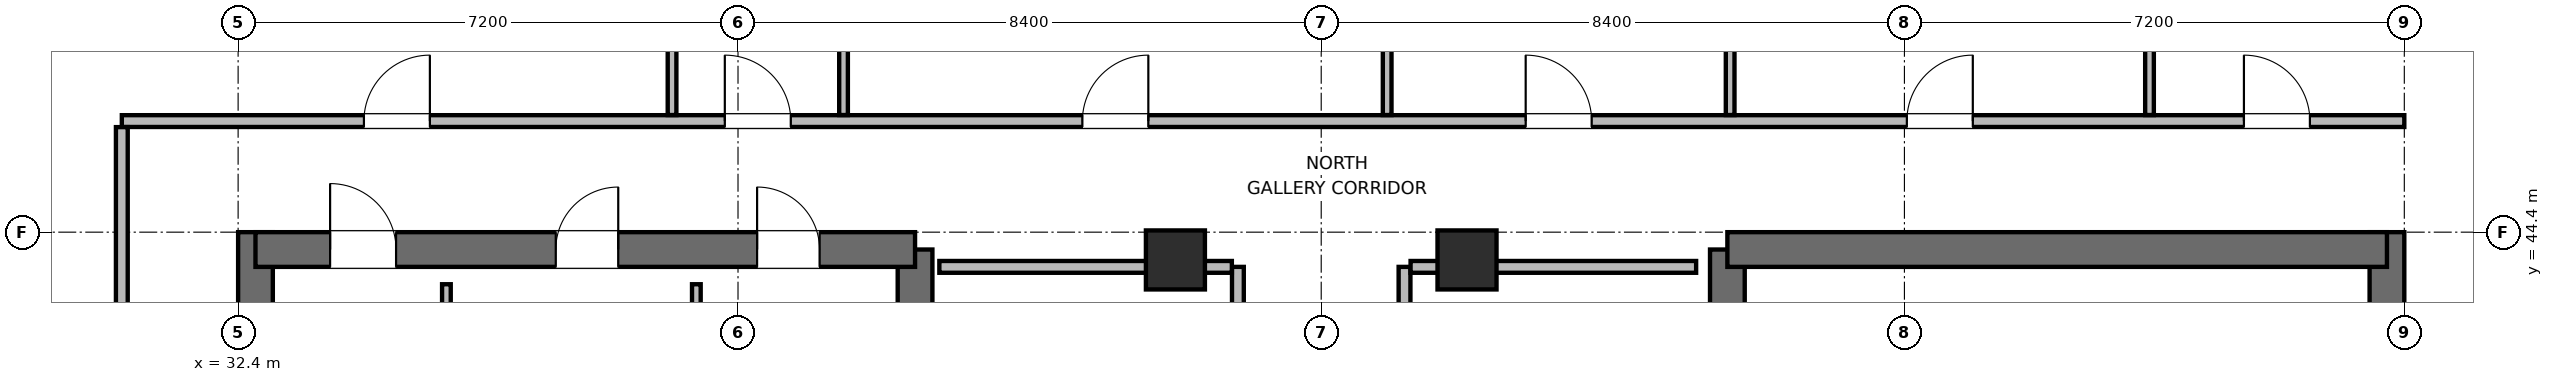
"""IFC4 building model, lengths in metres.
Left out: names, types, materials, properties, quantities, classifications, styles, units other than length and angle.
Written with IfcOpenShell. Run it as: python <this file> out.ifc"""

import sys

from ifc_helpers import new_model, si_unit, direction, frame, frame_2d, origin, origin_2d, place, context, subcontext, project, spatial, rectangle, extrude, element, fill, save


model = new_model("IFC4")
c1 = context("Model", 3, precision=1e-05, world=origin(), true_north=direction((0.0, 1.0)))
c2 = subcontext(c1, "Body", "Model", "MODEL_VIEW")
j1 = project(units=[si_unit("LENGTHUNIT", "METRE"), si_unit("PLANEANGLEUNIT", "RADIAN")], contexts=[c1])
p1 = place(None, origin())
s1 = spatial("IfcSite", under=j1, at=p1, CompositionType="ELEMENT")
p2 = place(p1, origin())
s2 = spatial("IfcBuilding", under=s1, at=p2, CompositionType="ELEMENT")
p3 = place(p2, frame((0.0, 0.0, 350.4)))
s3 = spatial("IfcBuildingStorey", under=s2, at=p3, CompositionType="ELEMENT", Elevation=350.4)
p4 = place(p3, frame((32.65, 27.6, 0.0), z_axis=(0.0, 0.0, 1.0), x_axis=(0.0, 1.0, 0.0)))
e1 = element("IfcWall", 1, at=p4, inside=s3, PredefinedType="SHEAR", context=c2, shape_type="SweptSolid", body=[
    extrude(rectangle(XDim=16.8, YDim=0.5, at=frame_2d((8.4, 0.0))), origin(), (0.0, 0.0, 1.0), 4.5),
])
p5 = place(p3, frame((42.15, 37.8, 0.0), z_axis=(0.0, 0.0, 1.0), x_axis=(0.0, 1.0, 0.0)))
e2 = element("IfcWall", 2, at=p5, inside=s3, PredefinedType="SHEAR", context=c2, shape_type="SweptSolid", body=[
    extrude(rectangle(XDim=6.35, YDim=0.5, at=frame_2d((3.175, 0.0))), origin(), (0.0, 0.0, 1.0), 4.5),
])
p6 = place(p3, frame((32.65, 44.15, 0.0), z_axis=(0.0, 0.0, 1.0), x_axis=(1.0, 0.0, 0.0)))
e3 = element("IfcWall", 3, at=p6, inside=s3, PredefinedType="SHEAR", context=c2, shape_type="SweptSolid", body=[
    extrude(rectangle(XDim=9.5, YDim=0.5, at=frame_2d((4.75, 0.0))), origin(), (0.0, 0.0, 1.0), 4.5),
])
p7 = place(p6, frame((1.075, 0.0, 0.0)))
e4 = element("IfcOpeningElement", 4, at=p7, cuts=e3, PredefinedType="OPENING", context=c2, shape_type="SweptSolid", body=[
    extrude(rectangle(XDim=0.95, YDim=2.04, at=frame_2d((0.475, 1.02))), frame((0.0, 0.26, 0.0), z_axis=(0.0, -1.0, 0.0), x_axis=(1.0, 0.0, 0.0)), (0.0, 0.0, 1.0), 0.52),
])
p8 = place(p6, frame((4.325, 0.0, 0.0)))
e5 = element("IfcOpeningElement", 5, at=p8, cuts=e3, PredefinedType="OPENING", context=c2, shape_type="SweptSolid", body=[
    extrude(rectangle(XDim=0.9, YDim=2.02, at=frame_2d((0.45, 1.01))), frame((0.0, 0.26, 0.0), z_axis=(0.0, -1.0, 0.0), x_axis=(1.0, 0.0, 0.0)), (0.0, 0.0, 1.0), 0.52),
])
p9 = place(p6, frame((7.225, 0.0, 0.0)))
e6 = element("IfcOpeningElement", 6, at=p9, cuts=e3, PredefinedType="OPENING", context=c2, shape_type="SweptSolid", body=[
    extrude(rectangle(XDim=0.9, YDim=2.02, at=frame_2d((0.45, 1.01))), frame((0.0, 0.26, 0.0), z_axis=(0.0, -1.0, 0.0), x_axis=(1.0, 0.0, 0.0)), (0.0, 0.0, 1.0), 0.52),
])
p10 = place(p3, frame((53.85, 38.0, 0.0), z_axis=(0.0, 0.0, 1.0), x_axis=(0.0, 1.0, 0.0)))
e7 = element("IfcWall", 7, at=p10, inside=s3, PredefinedType="SHEAR", context=c2, shape_type="SweptSolid", body=[
    extrude(rectangle(XDim=6.15, YDim=0.5, at=frame_2d((3.075, 0.0))), origin(), (0.0, 0.0, 1.0), 4.5),
])
p11 = place(p3, frame((63.35, 27.6, 0.0), z_axis=(0.0, 0.0, 1.0), x_axis=(0.0, 1.0, 0.0)))
e8 = element("IfcWall", 8, at=p11, inside=s3, PredefinedType="SHEAR", context=c2, shape_type="SweptSolid", body=[
    extrude(rectangle(XDim=16.8, YDim=0.5, at=frame_2d((8.4, 0.0))), origin(), (0.0, 0.0, 1.0), 4.5),
])
p12 = place(p3, frame((53.85, 44.15, 0.0), z_axis=(0.0, 0.0, 1.0), x_axis=(1.0, 0.0, 0.0)))
e9 = element("IfcWall", 9, at=p12, inside=s3, PredefinedType="SHEAR", context=c2, shape_type="SweptSolid", body=[
    extrude(rectangle(XDim=9.5, YDim=0.5, at=frame_2d((4.75, 0.0))), origin(), (0.0, 0.0, 1.0), 4.5),
])
for number, where, z_axis, x_axis in (
    (10, (45.9, 44.0, 0.0), (0.0, 0.0, 1.0), (1.0, 0.0, 0.0)),
    (11, (50.1, 44.0, 0.0), (0.0, 0.0, 1.0), (1.0, 0.0, 0.0)),
):
    element("IfcColumn", number, at=place(p3, frame(where, z_axis=z_axis, x_axis=x_axis)), inside=s3, PredefinedType="COLUMN", context=c2, shape_type="SweptSolid", body=[
        extrude(rectangle(XDim=0.85, YDim=0.85, at=origin_2d()), origin(), (0.0, 0.0, 1.0), 4.5),
    ])
for number, where, z_axis, x_axis in (
    (12, (35.4, 41.095, 0.0), (0.0, 0.0, 1.0), (0.0, 1.0, 0.0)),
    (13, (39.0, 41.095, 0.0), (0.0, 0.0, 1.0), (0.0, 1.0, 0.0)),
):
    element("IfcWall", number, at=place(p3, frame(where, z_axis=z_axis, x_axis=x_axis)), inside=s3, PredefinedType="PARTITIONING", context=c2, shape_type="SweptSolid", body=[
        extrude(rectangle(XDim=2.555, YDim=0.125, at=frame_2d((1.277, 0.0))), origin(), (0.0, 0.0, 1.0), 4.2),
    ])
p13 = place(p3, frame((46.8, 37.9, 0.0), z_axis=(0.0, 0.0, 1.0), x_axis=(0.0, 1.0, 0.0)))
e14 = element("IfcWall", 14, at=p13, inside=s3, PredefinedType="PARTITIONING", context=c2, shape_type="SweptSolid", body=[
    extrude(rectangle(XDim=6.0, YDim=0.17, at=frame_2d((3.0, 0.0))), origin(), (0.0, 0.0, 1.0), 4.2),
])
p14 = place(p13, frame((0.54, 0.0, 0.0)))
e15 = element("IfcOpeningElement", 15, at=p14, cuts=e14, PredefinedType="OPENING", context=c2, shape_type="SweptSolid", body=[
    extrude(rectangle(XDim=0.9, YDim=2.02, at=frame_2d((0.45, 1.01))), frame((0.0, 0.095, 0.0), z_axis=(0.0, -1.0, 0.0), x_axis=(1.0, 0.0, 0.0)), (0.0, 0.0, 1.0), 0.19),
])
p15 = place(p13, frame((2.55, 0.0, 0.0)))
e16 = element("IfcOpeningElement", 16, at=p15, cuts=e14, PredefinedType="OPENING", context=c2, shape_type="SweptSolid", body=[
    extrude(rectangle(XDim=0.9, YDim=2.02, at=frame_2d((0.45, 1.01))), frame((0.0, 0.095, 0.0), z_axis=(0.0, -1.0, 0.0), x_axis=(1.0, 0.0, 0.0)), (0.0, 0.0, 1.0), 0.19),
])
p16 = place(p13, frame((4.56, 0.0, 0.0)))
e17 = element("IfcOpeningElement", 17, at=p16, cuts=e14, PredefinedType="OPENING", context=c2, shape_type="SweptSolid", body=[
    extrude(rectangle(XDim=0.9, YDim=2.02, at=frame_2d((0.45, 1.01))), frame((0.0, 0.095, 0.0), z_axis=(0.0, -1.0, 0.0), x_axis=(1.0, 0.0, 0.0)), (0.0, 0.0, 1.0), 0.19),
])
p17 = place(p3, frame((42.5, 43.9, 0.0), z_axis=(0.0, 0.0, 1.0), x_axis=(1.0, 0.0, 0.0)))
e18 = element("IfcWall", 18, at=p17, inside=s3, PredefinedType="PARTITIONING", context=c2, shape_type="SweptSolid", body=[
    extrude(rectangle(XDim=4.213, YDim=0.17, at=frame_2d((2.106, 0.0))), origin(), (0.0, 0.0, 1.0), 3.285),
])
p18 = place(p3, frame((49.2, 37.9, 0.0), z_axis=(0.0, 0.0, 1.0), x_axis=(0.0, 1.0, 0.0)))
e19 = element("IfcWall", 19, at=p18, inside=s3, PredefinedType="PARTITIONING", context=c2, shape_type="SweptSolid", body=[
    extrude(rectangle(XDim=6.0, YDim=0.17, at=frame_2d((3.0, 0.0))), origin(), (0.0, 0.0, 1.0), 4.2),
])
p19 = place(p18, frame((0.69, 0.0, 0.0)))
e20 = element("IfcOpeningElement", 20, at=p19, cuts=e19, PredefinedType="OPENING", context=c2, shape_type="SweptSolid", body=[
    extrude(rectangle(XDim=0.9, YDim=2.02, at=frame_2d((0.45, 1.01))), frame((0.0, 0.095, 0.0), z_axis=(0.0, -1.0, 0.0), x_axis=(1.0, 0.0, 0.0)), (0.0, 0.0, 1.0), 0.19),
])
p20 = place(p18, frame((3.69, 0.0, 0.0)))
e21 = element("IfcOpeningElement", 21, at=p20, cuts=e19, PredefinedType="OPENING", context=c2, shape_type="SweptSolid", body=[
    extrude(rectangle(XDim=0.9, YDim=2.02, at=frame_2d((0.45, 1.01))), frame((0.0, 0.095, 0.0), z_axis=(0.0, -1.0, 0.0), x_axis=(1.0, 0.0, 0.0)), (0.0, 0.0, 1.0), 0.19),
])
p21 = place(p3, frame((49.287, 43.9, 0.0), z_axis=(0.0, 0.0, 1.0), x_axis=(1.0, 0.0, 0.0)))
e22 = element("IfcWall", 22, at=p21, inside=s3, PredefinedType="PARTITIONING", context=c2, shape_type="SweptSolid", body=[
    extrude(rectangle(XDim=4.113, YDim=0.17, at=frame_2d((2.056, 0.0))), origin(), (0.0, 0.0, 1.0), 3.285),
])
p22 = place(p3, frame((30.725, 46.0, 0.0), z_axis=(0.0, 0.0, 1.0), x_axis=(1.0, 0.0, 0.0)))
e23 = element("IfcWall", 23, at=p22, inside=s3, PredefinedType="PARTITIONING", context=c2, shape_type="SweptSolid", body=[
    extrude(rectangle(XDim=32.875, YDim=0.17, at=frame_2d((16.438, 0.0))), origin(), (0.0, 0.0, 1.0), 4.2),
])
p23 = place(p22, frame((3.487, 0.0, 0.0)))
e24 = element("IfcOpeningElement", 24, at=p23, cuts=e23, PredefinedType="OPENING", context=c2, shape_type="SweptSolid", body=[
    extrude(rectangle(XDim=0.95, YDim=2.04, at=frame_2d((0.475, 1.02))), frame((0.0, 0.095, 0.0), z_axis=(0.0, -1.0, 0.0), x_axis=(1.0, 0.0, 0.0)), (0.0, 0.0, 1.0), 0.19),
])
p24 = place(p22, frame((8.685, 0.0, 0.0)))
e25 = element("IfcOpeningElement", 25, at=p24, cuts=e23, PredefinedType="OPENING", context=c2, shape_type="SweptSolid", body=[
    extrude(rectangle(XDim=0.95, YDim=2.04, at=frame_2d((0.475, 1.02))), frame((0.0, 0.095, 0.0), z_axis=(0.0, -1.0, 0.0), x_axis=(1.0, 0.0, 0.0)), (0.0, 0.0, 1.0), 0.19),
])
p25 = place(p22, frame((13.835, 0.0, 0.0)))
e26 = element("IfcOpeningElement", 26, at=p25, cuts=e23, PredefinedType="OPENING", context=c2, shape_type="SweptSolid", body=[
    extrude(rectangle(XDim=0.95, YDim=2.04, at=frame_2d((0.475, 1.02))), frame((0.0, 0.095, 0.0), z_axis=(0.0, -1.0, 0.0), x_axis=(1.0, 0.0, 0.0)), (0.0, 0.0, 1.0), 0.19),
])
p26 = place(p22, frame((20.22, 0.0, 0.0)))
e27 = element("IfcOpeningElement", 27, at=p26, cuts=e23, PredefinedType="OPENING", context=c2, shape_type="SweptSolid", body=[
    extrude(rectangle(XDim=0.95, YDim=2.04, at=frame_2d((0.475, 1.02))), frame((0.0, 0.095, 0.0), z_axis=(0.0, -1.0, 0.0), x_axis=(1.0, 0.0, 0.0)), (0.0, 0.0, 1.0), 0.19),
])
p27 = place(p22, frame((25.71, 0.0, 0.0)))
e28 = element("IfcOpeningElement", 28, at=p27, cuts=e23, PredefinedType="OPENING", context=c2, shape_type="SweptSolid", body=[
    extrude(rectangle(XDim=0.95, YDim=2.04, at=frame_2d((0.475, 1.02))), frame((0.0, 0.095, 0.0), z_axis=(0.0, -1.0, 0.0), x_axis=(1.0, 0.0, 0.0)), (0.0, 0.0, 1.0), 0.19),
])
p28 = place(p22, frame((30.565, 0.0, 0.0)))
e29 = element("IfcOpeningElement", 29, at=p28, cuts=e23, PredefinedType="OPENING", context=c2, shape_type="SweptSolid", body=[
    extrude(rectangle(XDim=0.95, YDim=2.04, at=frame_2d((0.475, 1.02))), frame((0.0, 0.095, 0.0), z_axis=(0.0, -1.0, 0.0), x_axis=(1.0, 0.0, 0.0)), (0.0, 0.0, 1.0), 0.19),
])
p29 = place(p3, frame((30.725, 26.087, 0.0), z_axis=(0.0, 0.0, 1.0), x_axis=(0.0, 1.0, 0.0)))
e30 = element("IfcWall", 30, at=p29, inside=s3, PredefinedType="PARTITIONING", context=c2, shape_type="SweptSolid", body=[
    extrude(rectangle(XDim=19.826, YDim=0.17, at=frame_2d((9.913, 0.0))), origin(), (0.0, 0.0, 1.0), 4.2),
])
p30 = place(p29, frame((4.038, 0.0, 0.0)))
e31 = element("IfcOpeningElement", 31, at=p30, cuts=e30, PredefinedType="OPENING", context=c2, shape_type="SweptSolid", body=[
    extrude(rectangle(XDim=0.95, YDim=2.04, at=frame_2d((0.475, 1.02))), frame((0.0, 0.095, 0.0), z_axis=(0.0, -1.0, 0.0), x_axis=(1.0, 0.0, 0.0)), (0.0, 0.0, 1.0), 0.19),
])
p31 = place(p29, frame((14.038, 0.0, 0.0)))
e32 = element("IfcOpeningElement", 32, at=p31, cuts=e30, PredefinedType="OPENING", context=c2, shape_type="SweptSolid", body=[
    extrude(rectangle(XDim=0.95, YDim=2.04, at=frame_2d((0.475, 1.02))), frame((0.0, 0.095, 0.0), z_axis=(0.0, -1.0, 0.0), x_axis=(1.0, 0.0, 0.0)), (0.0, 0.0, 1.0), 0.19),
])
p32 = place(p3, frame((38.65, 46.087, 0.0), z_axis=(0.0, 0.0, 1.0), x_axis=(0.0, 1.0, 0.0)))
e33 = element("IfcWall", 33, at=p32, inside=s3, PredefinedType="PARTITIONING", context=c2, shape_type="SweptSolid", body=[
    extrude(rectangle(XDim=7.068, YDim=0.125, at=frame_2d((3.534, 0.0))), origin(), (0.0, 0.0, 1.0), 4.2),
])
p33 = place(p3, frame((41.12, 46.087, 0.0), z_axis=(0.0, 0.0, 1.0), x_axis=(0.0, 1.0, 0.0)))
e34 = element("IfcWall", 34, at=p33, inside=s3, PredefinedType="PARTITIONING", context=c2, shape_type="SweptSolid", body=[
    extrude(rectangle(XDim=7.313, YDim=0.125, at=frame_2d((3.656, 0.0))), origin(), (0.0, 0.0, 1.0), 3.523),
])
p34 = place(p3, frame((48.95, 46.087, 0.0), z_axis=(0.0, 0.0, 1.0), x_axis=(0.0, 1.0, 0.0)))
e35 = element("IfcWall", 35, at=p34, inside=s3, PredefinedType="PARTITIONING", context=c2, shape_type="SweptSolid", body=[
    extrude(rectangle(XDim=3.758, YDim=0.125, at=frame_2d((1.879, 0.0))), origin(), (0.0, 0.0, 1.0), 4.2),
])
p35 = place(p3, frame((53.89, 46.087, 0.0), z_axis=(0.0, 0.0, 1.0), x_axis=(0.0, 1.0, 0.0)))
e36 = element("IfcWall", 36, at=p35, inside=s3, PredefinedType="PARTITIONING", context=c2, shape_type="SweptSolid", body=[
    extrude(rectangle(XDim=6.679, YDim=0.125, at=frame_2d((3.34, 0.0))), origin(), (0.0, 0.0, 1.0), 3.523),
])
p36 = place(p3, frame((59.93, 46.087, 0.0), z_axis=(0.0, 0.0, 1.0), x_axis=(0.0, 1.0, 0.0)))
e37 = element("IfcWall", 37, at=p36, inside=s3, PredefinedType="PARTITIONING", context=c2, shape_type="SweptSolid", body=[
    extrude(rectangle(XDim=7.038, YDim=0.125, at=frame_2d((3.519, 0.0))), origin(), (0.0, 0.0, 1.0), 4.2),
])
p37 = place(p7, origin())
e38 = element("IfcDoor", 38, at=p37, inside=s3, OperationType="SINGLE_SWING_LEFT", PredefinedType="DOOR", context=c2, shape_type="SweptSolid", body=[
    extrude(rectangle(XDim=0.95, YDim=2.04, at=frame_2d((0.475, 1.02))), frame((0.0, 0.025, 0.0), z_axis=(0.0, -1.0, 0.0), x_axis=(1.0, 0.0, 0.0)), (0.0, 0.0, 1.0), 0.05),
])
fill(e4, e38)
p38 = place(p8, origin())
e39 = element("IfcDoor", 39, at=p38, inside=s3, OperationType="SINGLE_SWING_RIGHT", PredefinedType="DOOR", context=c2, shape_type="SweptSolid", body=[
    extrude(rectangle(XDim=0.9, YDim=2.02, at=frame_2d((0.45, 1.01))), frame((0.0, 0.025, 0.0), z_axis=(0.0, -1.0, 0.0), x_axis=(1.0, 0.0, 0.0)), (0.0, 0.0, 1.0), 0.05),
])
fill(e5, e39)
p39 = place(p9, origin())
e40 = element("IfcDoor", 40, at=p39, inside=s3, OperationType="SINGLE_SWING_LEFT", PredefinedType="DOOR", context=c2, shape_type="SweptSolid", body=[
    extrude(rectangle(XDim=0.9, YDim=2.02, at=frame_2d((0.45, 1.01))), frame((0.0, 0.025, 0.0), z_axis=(0.0, -1.0, 0.0), x_axis=(1.0, 0.0, 0.0)), (0.0, 0.0, 1.0), 0.05),
])
fill(e6, e40)
p40 = place(p23, origin())
e41 = element("IfcDoor", 41, at=p40, inside=s3, OperationType="SINGLE_SWING_RIGHT", PredefinedType="DOOR", context=c2, shape_type="SweptSolid", body=[
    extrude(rectangle(XDim=0.95, YDim=2.04, at=frame_2d((0.475, 1.02))), frame((0.0, 0.025, 0.0), z_axis=(0.0, -1.0, 0.0), x_axis=(1.0, 0.0, 0.0)), (0.0, 0.0, 1.0), 0.05),
])
fill(e24, e41)
p41 = place(p24, origin())
e42 = element("IfcDoor", 42, at=p41, inside=s3, OperationType="SINGLE_SWING_LEFT", PredefinedType="DOOR", context=c2, shape_type="SweptSolid", body=[
    extrude(rectangle(XDim=0.95, YDim=2.04, at=frame_2d((0.475, 1.02))), frame((0.0, 0.025, 0.0), z_axis=(0.0, -1.0, 0.0), x_axis=(1.0, 0.0, 0.0)), (0.0, 0.0, 1.0), 0.05),
])
fill(e25, e42)
p42 = place(p25, origin())
e43 = element("IfcDoor", 43, at=p42, inside=s3, OperationType="SINGLE_SWING_RIGHT", PredefinedType="DOOR", context=c2, shape_type="SweptSolid", body=[
    extrude(rectangle(XDim=0.95, YDim=2.04, at=frame_2d((0.475, 1.02))), frame((0.0, 0.025, 0.0), z_axis=(0.0, -1.0, 0.0), x_axis=(1.0, 0.0, 0.0)), (0.0, 0.0, 1.0), 0.05),
])
fill(e26, e43)
p43 = place(p26, origin())
e44 = element("IfcDoor", 44, at=p43, inside=s3, OperationType="SINGLE_SWING_LEFT", PredefinedType="DOOR", context=c2, shape_type="SweptSolid", body=[
    extrude(rectangle(XDim=0.95, YDim=2.04, at=frame_2d((0.475, 1.02))), frame((0.0, 0.025, 0.0), z_axis=(0.0, -1.0, 0.0), x_axis=(1.0, 0.0, 0.0)), (0.0, 0.0, 1.0), 0.05),
])
fill(e27, e44)
p44 = place(p27, origin())
e45 = element("IfcDoor", 45, at=p44, inside=s3, OperationType="SINGLE_SWING_RIGHT", PredefinedType="DOOR", context=c2, shape_type="SweptSolid", body=[
    extrude(rectangle(XDim=0.95, YDim=2.04, at=frame_2d((0.475, 1.02))), frame((0.0, 0.025, 0.0), z_axis=(0.0, -1.0, 0.0), x_axis=(1.0, 0.0, 0.0)), (0.0, 0.0, 1.0), 0.05),
])
fill(e28, e45)
p45 = place(p28, origin())
e46 = element("IfcDoor", 46, at=p45, inside=s3, OperationType="SINGLE_SWING_LEFT", PredefinedType="DOOR", context=c2, shape_type="SweptSolid", body=[
    extrude(rectangle(XDim=0.95, YDim=2.04, at=frame_2d((0.475, 1.02))), frame((0.0, 0.025, 0.0), z_axis=(0.0, -1.0, 0.0), x_axis=(1.0, 0.0, 0.0)), (0.0, 0.0, 1.0), 0.05),
])
fill(e29, e46)
save(model, sys.argv[1])
